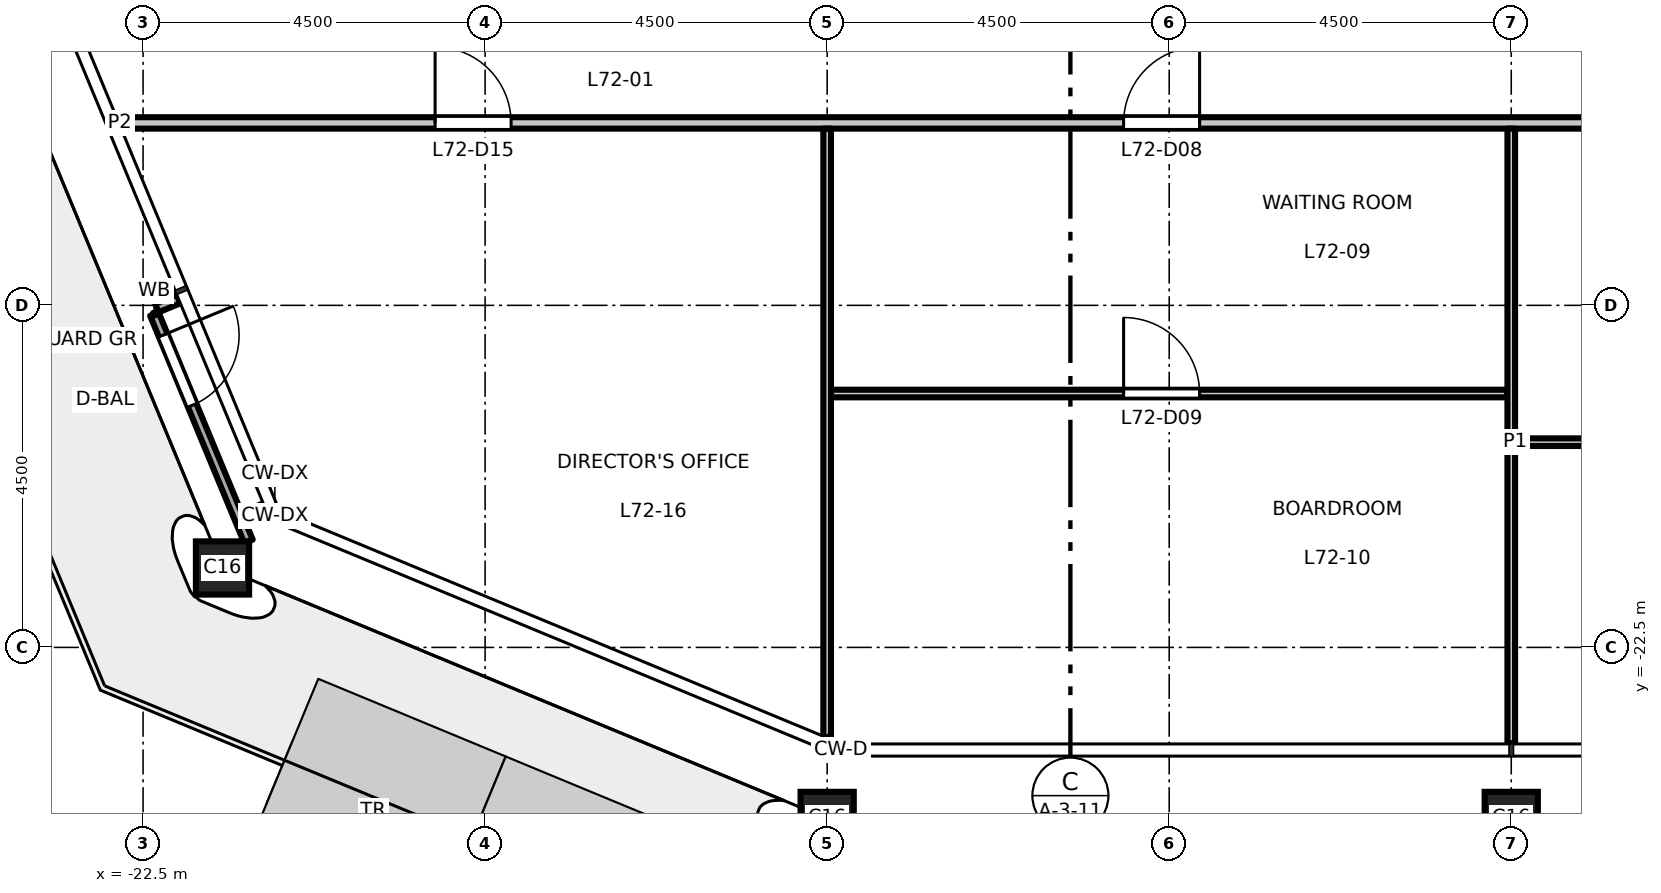
"""IFC4 building model, lengths in metres.
Left out: names, types, materials, properties, quantities, classifications, styles, units other than length and angle.
Written with IfcOpenShell. Run it as: python <this file> out.ifc"""

import sys

from ifc_helpers import new_model, si_unit, direction, frame, frame_2d, origin, origin_2d, place, context, subcontext, project, spatial, rectangle, hollow_rectangle, extrude, element, fill, save


model = new_model("IFC4")
c1 = context("Model", 3, precision=1e-05, world=origin(), true_north=direction((0.0, 1.0)))
c2 = subcontext(c1, "Body", "Model", "MODEL_VIEW")
j1 = project(units=[si_unit("LENGTHUNIT", "METRE"), si_unit("PLANEANGLEUNIT", "RADIAN")], contexts=[c1])
p1 = place(None, origin())
s1 = spatial("IfcSite", under=j1, at=p1, CompositionType="ELEMENT")
p2 = place(p1, origin())
s2 = spatial("IfcBuilding", under=s1, at=p2, CompositionType="ELEMENT")
p3 = place(p2, frame((0.0, 0.0, 334.7)))
s3 = spatial("IfcBuildingStorey", under=s2, at=p3, CompositionType="ELEMENT", Elevation=334.7)
for number, where, z_axis, x_axis in (
    (1, (-13.5, -24.75, 0.0), (0.0, 0.0, 1.0), (1.0, 0.0, 0.0)),
    (2, (-4.5, -24.75, 0.0), (0.0, 0.0, 1.0), (1.0, 0.0, 0.0)),
    (3, (-21.455, -21.455, 0.0), (0.0, 0.0, 1.0), (1.0, 0.0, 0.0)),
):
    element("IfcColumn", number, at=place(p3, frame(where, z_axis=z_axis, x_axis=x_axis)), inside=s3, PredefinedType="COLUMN", context=c2, shape_type="SweptSolid", body=[
        extrude(hollow_rectangle(XDim=0.7, YDim=0.7, WallThickness=0.036, at=origin_2d()), origin(), (0.0, 0.0, 1.0), 4.5),
    ])
p4 = place(p3, frame((-22.033, -17.917, 0.0), z_axis=(0.0, 0.0, 1.0), x_axis=(-0.923844027884, -0.382769136873, 0.0)))
e4 = element("IfcWall", 4, at=p4, inside=s3, PredefinedType="STANDARD", context=c2, shape_type="SweptSolid", body=[
    extrude(rectangle(XDim=0.31, YDim=0.12, at=frame_2d((0.155, 0.0))), origin(), (0.0, 0.0, 1.0), 4.35),
])
p5 = place(p3, frame((-20.896, -20.66, 0.0), z_axis=(0.0, 0.0, 1.0), x_axis=(-0.923959293734, -0.382490814953, 0.0)))
e5 = element("IfcWall", 5, at=p5, inside=s3, PredefinedType="STANDARD", context=c2, shape_type="SweptSolid", body=[
    extrude(rectangle(XDim=0.31, YDim=0.12, at=frame_2d((0.155, 0.0))), origin(), (0.0, 0.0, 1.0), 4.35),
])
p6 = place(p3, frame((-22.352, -18.115, 0.0), z_axis=(0.0, 0.0, 1.0), x_axis=(0.382702621907, -0.923871583709, 0.0)))
e6 = element("IfcWall", 6, at=p6, inside=s3, PredefinedType="STANDARD", context=c2, shape_type="SweptSolid", body=[
    extrude(rectangle(XDim=3.237, YDim=0.12, at=frame_2d((1.618, 0.0))), origin(), (0.0, 0.0, 1.0), 4.35),
])
p7 = place(p6, frame((0.3, 0.0, 0.0)))
e7 = element("IfcOpeningElement", 7, at=p7, cuts=e6, PredefinedType="OPENING", context=c2, shape_type="SweptSolid", body=[
    extrude(rectangle(XDim=1.0, YDim=2.4, at=frame_2d((0.5, 1.2))), frame((0.0, 0.07, 0.0), z_axis=(0.0, -1.0, 0.0), x_axis=(1.0, 0.0, 0.0)), (0.0, 0.0, 1.0), 0.14),
])
p8 = place(p3, frame((-4.45, -19.8, 0.0), z_axis=(0.0, 0.0, 1.0), x_axis=(1.0, 0.0, 0.0)))
e8 = element("IfcWall", 8, at=p8, inside=s3, PredefinedType="PARTITIONING", context=c2, shape_type="SweptSolid", body=[
    extrude(rectangle(XDim=8.9, YDim=0.1, at=frame_2d((4.45, 0.0))), origin(), (0.0, 0.0, 1.0), 4.35),
])
p9 = place(p8, frame((3.85, 0.0, 0.0)))
e9 = element("IfcOpeningElement", 9, at=p9, cuts=e8, PredefinedType="OPENING", context=c2, shape_type="SweptSolid", body=[
    extrude(rectangle(XDim=1.0, YDim=2.1, at=frame_2d((0.5, 1.05))), frame((0.0, 0.06, 0.0), z_axis=(0.0, -1.0, 0.0), x_axis=(1.0, 0.0, 0.0)), (0.0, 0.0, 1.0), 0.12),
])
p10 = place(p3, frame((-13.45, -19.16, 0.0), z_axis=(0.0, 0.0, 1.0), x_axis=(1.0, 0.0, 0.0)))
e10 = element("IfcWall", 10, at=p10, inside=s3, PredefinedType="PARTITIONING", context=c2, shape_type="SweptSolid", body=[
    extrude(rectangle(XDim=8.9, YDim=0.1, at=frame_2d((4.45, 0.0))), origin(), (0.0, 0.0, 1.0), 4.35),
])
p11 = place(p10, frame((3.85, 0.0, 0.0)))
e11 = element("IfcOpeningElement", 11, at=p11, cuts=e10, PredefinedType="OPENING", context=c2, shape_type="SweptSolid", body=[
    extrude(rectangle(XDim=1.0, YDim=2.1, at=frame_2d((0.5, 1.05))), frame((0.0, 0.06, 0.0), z_axis=(0.0, -1.0, 0.0), x_axis=(1.0, 0.0, 0.0)), (0.0, 0.0, 1.0), 0.12),
])
p12 = place(p3, frame((-22.808, -15.6, 0.0), z_axis=(0.0, 0.0, 1.0), x_axis=(1.0, 0.0, 0.0)))
e12 = element("IfcWall", 12, at=p12, inside=s3, PredefinedType="PARTITIONING", context=c2, shape_type="SweptSolid", body=[
    extrude(rectangle(XDim=45.616, YDim=0.15, at=frame_2d((22.808, 0.0))), origin(), (0.0, 0.0, 1.0), 4.35),
])
p13 = place(p12, frame((13.208, 0.0, 0.0)))
e13 = element("IfcOpeningElement", 13, at=p13, cuts=e12, PredefinedType="OPENING", context=c2, shape_type="SweptSolid", body=[
    extrude(rectangle(XDim=1.0, YDim=2.1, at=frame_2d((0.5, 1.05))), frame((0.0, 0.085, 0.0), z_axis=(0.0, -1.0, 0.0), x_axis=(1.0, 0.0, 0.0)), (0.0, 0.0, 1.0), 0.17),
])
p14 = place(p12, frame((22.208, 0.0, 0.0)))
e14 = element("IfcOpeningElement", 14, at=p14, cuts=e12, PredefinedType="OPENING", context=c2, shape_type="SweptSolid", body=[
    extrude(rectangle(XDim=1.0, YDim=2.1, at=frame_2d((0.5, 1.05))), frame((0.0, 0.085, 0.0), z_axis=(0.0, -1.0, 0.0), x_axis=(1.0, 0.0, 0.0)), (0.0, 0.0, 1.0), 0.17),
])
p15 = place(p12, frame((31.208, 0.0, 0.0)))
e15 = element("IfcOpeningElement", 15, at=p15, cuts=e12, PredefinedType="OPENING", context=c2, shape_type="SweptSolid", body=[
    extrude(rectangle(XDim=1.0, YDim=2.1, at=frame_2d((0.5, 1.05))), frame((0.0, 0.085, 0.0), z_axis=(0.0, -1.0, 0.0), x_axis=(1.0, 0.0, 0.0)), (0.0, 0.0, 1.0), 0.17),
])
p16 = place(p12, frame((4.15, 0.0, 0.0)))
e16 = element("IfcOpeningElement", 16, at=p16, cuts=e12, PredefinedType="OPENING", context=c2, shape_type="SweptSolid", body=[
    extrude(rectangle(XDim=1.0, YDim=2.1, at=frame_2d((0.5, 1.05))), frame((0.0, 0.085, 0.0), z_axis=(0.0, -1.0, 0.0), x_axis=(1.0, 0.0, 0.0)), (0.0, 0.0, 1.0), 0.17),
])
p17 = place(p12, frame((40.458, 0.0, 0.0)))
e17 = element("IfcOpeningElement", 17, at=p17, cuts=e12, PredefinedType="OPENING", context=c2, shape_type="SweptSolid", body=[
    extrude(rectangle(XDim=1.0, YDim=2.1, at=frame_2d((0.5, 1.05))), frame((0.0, 0.085, 0.0), z_axis=(0.0, -1.0, 0.0), x_axis=(1.0, 0.0, 0.0)), (0.0, 0.0, 1.0), 0.17),
])
p18 = place(p3, frame((-13.5, -23.678, 0.0), z_axis=(0.0, 0.0, 1.0), x_axis=(0.0, 1.0, 0.0)))
e18 = element("IfcWall", 18, at=p18, inside=s3, PredefinedType="PARTITIONING", context=c2, shape_type="SweptSolid", body=[
    extrude(rectangle(XDim=8.003, YDim=0.1, at=frame_2d((4.001, 0.0))), origin(), (0.0, 0.0, 1.0), 3.75),
])
p19 = place(p3, frame((-4.5, -23.76, 0.0), z_axis=(0.0, 0.0, 1.0), x_axis=(0.0, 1.0, 0.0)))
e19 = element("IfcWall", 19, at=p19, inside=s3, PredefinedType="PARTITIONING", context=c2, shape_type="SweptSolid", body=[
    extrude(rectangle(XDim=8.085, YDim=0.1, at=frame_2d((4.042, 0.0))), origin(), (0.0, 0.0, 1.0), 3.65),
])
p20 = place(p7, origin())
e20 = element("IfcDoor", 20, at=p20, inside=s3, OperationType="SINGLE_SWING_LEFT", PredefinedType="DOOR", context=c2, shape_type="SweptSolid", body=[
    extrude(rectangle(XDim=1.0, YDim=2.4, at=frame_2d((0.5, 1.2))), frame((0.0, 0.025, 0.0), z_axis=(0.0, -1.0, 0.0), x_axis=(1.0, 0.0, 0.0)), (0.0, 0.0, 1.0), 0.05),
])
fill(e7, e20)
p21 = place(p13, origin())
e21 = element("IfcDoor", 21, at=p21, inside=s3, OperationType="SINGLE_SWING_RIGHT", PredefinedType="DOOR", context=c2, shape_type="SweptSolid", body=[
    extrude(rectangle(XDim=1.0, YDim=2.1, at=frame_2d((0.5, 1.05))), frame((0.0, 0.025, 0.0), z_axis=(0.0, -1.0, 0.0), x_axis=(1.0, 0.0, 0.0)), (0.0, 0.0, 1.0), 0.05),
])
fill(e13, e21)
p22 = place(p11, origin())
e22 = element("IfcDoor", 22, at=p22, inside=s3, OperationType="SINGLE_SWING_LEFT", PredefinedType="DOOR", context=c2, shape_type="SweptSolid", body=[
    extrude(rectangle(XDim=1.0, YDim=2.1, at=frame_2d((0.5, 1.05))), frame((0.0, 0.025, 0.0), z_axis=(0.0, -1.0, 0.0), x_axis=(1.0, 0.0, 0.0)), (0.0, 0.0, 1.0), 0.05),
])
fill(e11, e22)
p23 = place(p16, origin())
e23 = element("IfcDoor", 23, at=p23, inside=s3, OperationType="SINGLE_SWING_LEFT", PredefinedType="DOOR", context=c2, shape_type="SweptSolid", body=[
    extrude(rectangle(XDim=1.0, YDim=2.1, at=frame_2d((0.5, 1.05))), frame((0.0, 0.025, 0.0), z_axis=(0.0, -1.0, 0.0), x_axis=(1.0, 0.0, 0.0)), (0.0, 0.0, 1.0), 0.05),
])
fill(e16, e23)
save(model, sys.argv[1])
